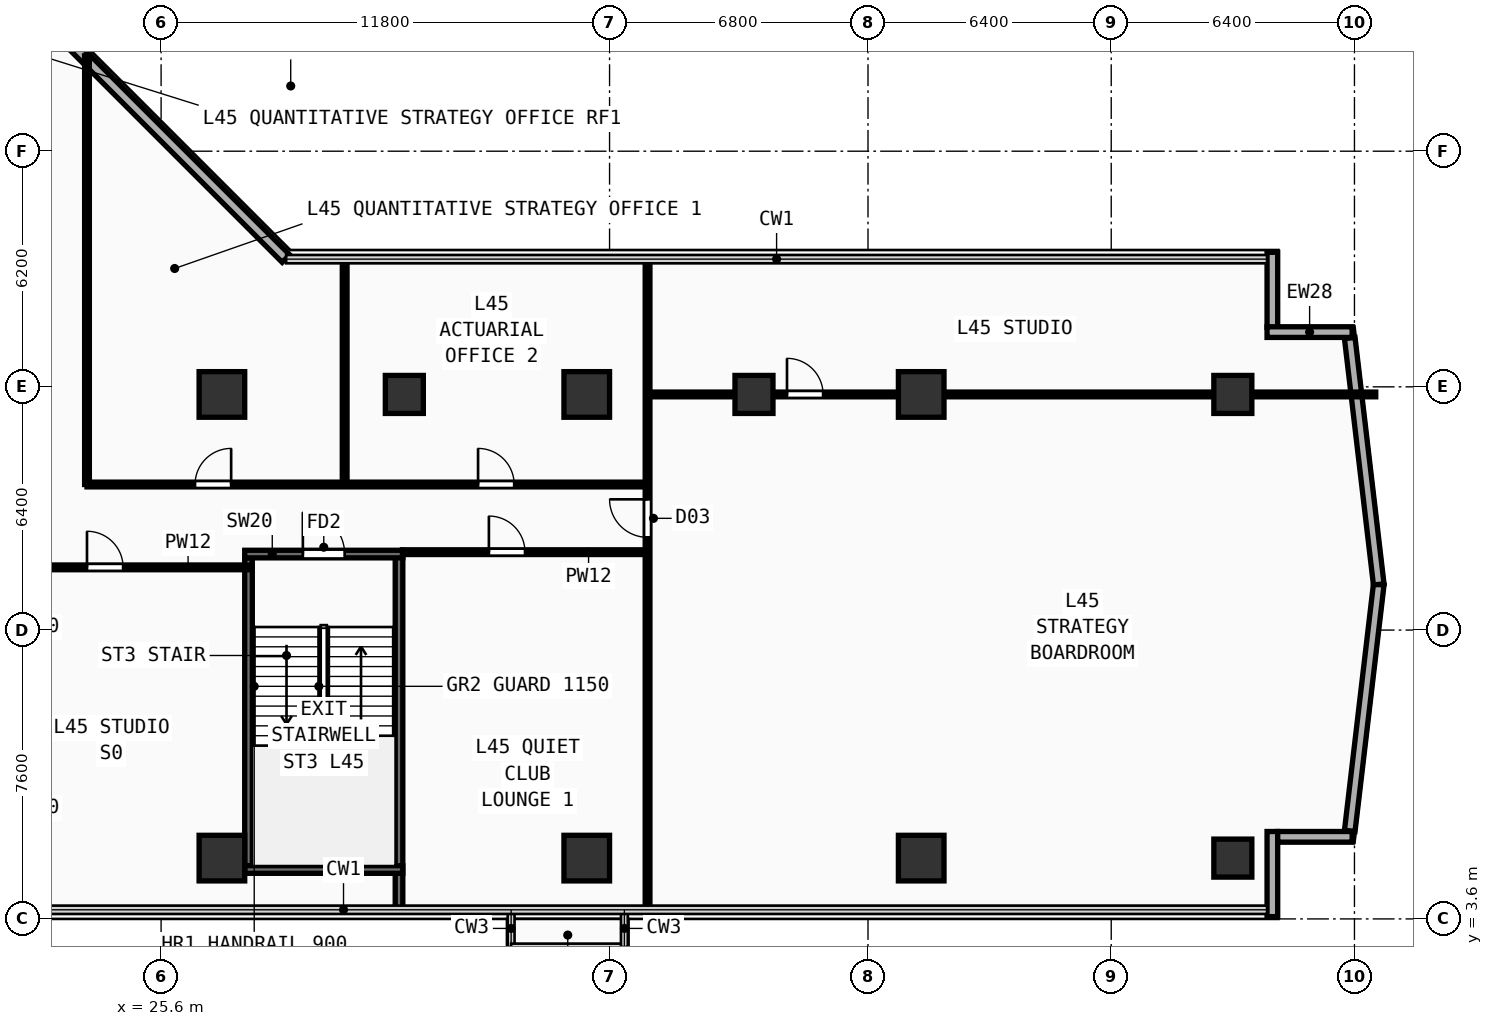
"""IFC4 building model, lengths in metres.
Left out: names, types, materials, properties, quantities, classifications, styles, units other than length and angle.
Written with IfcOpenShell. Run it as: python <this file> out.ifc"""

import sys

from ifc_helpers import new_model, si_unit, direction, frame, frame_2d, origin, origin_2d, place, context, subcontext, project, spatial, rectangle, extrude, element, fill, save


model = new_model("IFC4")
c1 = context("Model", 3, precision=1e-05, world=origin(), true_north=direction((0.0, 1.0)))
c2 = subcontext(c1, "Body", "Model", "MODEL_VIEW")
j1 = project(units=[si_unit("LENGTHUNIT", "METRE"), si_unit("PLANEANGLEUNIT", "RADIAN")], contexts=[c1])
p1 = place(None, origin())
s1 = spatial("IfcSite", under=j1, at=p1, CompositionType="ELEMENT")
p2 = place(p1, origin())
s2 = spatial("IfcBuilding", under=s1, at=p2, CompositionType="ELEMENT")
p3 = place(p2, frame((0.0, 0.0, 176.6)))
s3 = spatial("IfcBuildingStorey", under=s2, at=p3, CompositionType="ELEMENT", Elevation=176.6)
for number, where, z_axis, x_axis in (
    (1, (27.2, 5.2, 0.0), (0.0, 0.0, 1.0), (1.0, 0.0, 0.0)),
    (2, (36.8, 5.2, 0.0), (0.0, 0.0, 1.0), (1.0, 0.0, 0.0)),
    (3, (45.6, 5.2, 0.0), (0.0, 0.0, 1.0), (1.0, 0.0, 0.0)),
    (4, (27.2, 17.4, 0.0), (0.0, 0.0, 1.0), (1.0, 0.0, 0.0)),
    (5, (36.8, 17.4, 0.0), (0.0, 0.0, 1.0), (1.0, 0.0, 0.0)),
    (6, (45.6, 17.4, 0.0), (0.0, 0.0, 1.0), (1.0, 0.0, 0.0)),
):
    element("IfcColumn", number, at=place(p3, frame(where, z_axis=z_axis, x_axis=x_axis)), inside=s3, PredefinedType="COLUMN", context=c2, shape_type="SweptSolid", body=[
        extrude(rectangle(XDim=1.2, YDim=1.2, at=origin_2d()), origin(), (0.0, 0.0, 1.0), 3.56),
    ])
for number, where, z_axis, x_axis in (
    (7, (53.8, 5.2, 0.0), (0.0, 0.0, 1.0), (1.0, 0.0, 0.0)),
    (8, (53.8, 17.4, 0.0), (0.0, 0.0, 1.0), (1.0, 0.0, 0.0)),
    (9, (32.0, 17.4, 0.0), (0.0, 0.0, 1.0), (1.0, 0.0, 0.0)),
    (10, (41.2, 17.4, 0.0), (0.0, 0.0, 1.0), (1.0, 0.0, 0.0)),
):
    element("IfcColumn", number, at=place(p3, frame(where, z_axis=z_axis, x_axis=x_axis)), inside=s3, PredefinedType="COLUMN", context=c2, shape_type="SweptSolid", body=[
        extrude(rectangle(XDim=1.0, YDim=1.0, at=origin_2d()), origin(), (0.0, 0.0, 1.0), 3.56),
    ])
p4 = place(p3, frame((54.84, 3.66, 0.0), z_axis=(0.0, 0.0, 1.0), x_axis=(0.0, 1.0, 0.0)))
e11 = element("IfcWall", 11, at=p4, inside=s3, PredefinedType="SOLIDWALL", context=c2, shape_type="SweptSolid", body=[
    extrude(rectangle(XDim=2.24, YDim=0.28, at=frame_2d((1.12, 0.0))), origin(), (0.0, 0.0, 1.0), 3.56),
])
p5 = place(p3, frame((54.98, 5.76, 0.0), z_axis=(0.0, 0.0, 1.0), x_axis=(1.0, 0.0, 0.0)))
e12 = element("IfcWall", 12, at=p5, inside=s3, PredefinedType="SOLIDWALL", context=c2, shape_type="SweptSolid", body=[
    extrude(rectangle(XDim=1.96, YDim=0.28, at=frame_2d((0.98, 0.0))), origin(), (0.0, 0.0, 1.0), 3.56),
])
p6 = place(p3, frame((54.84, 19.165, 0.0), z_axis=(0.0, 0.0, 1.0), x_axis=(0.0, 1.0, 0.0)))
e13 = element("IfcWall", 13, at=p6, inside=s3, PredefinedType="SOLIDWALL", context=c2, shape_type="SweptSolid", body=[
    extrude(rectangle(XDim=1.975, YDim=0.28, at=frame_2d((0.987, 0.0))), origin(), (0.0, 0.0, 1.0), 3.56),
])
p7 = place(p3, frame((54.7, 19.04, 0.0), z_axis=(0.0, 0.0, 1.0), x_axis=(1.0, 0.0, 0.0)))
e14 = element("IfcWall", 14, at=p7, inside=s3, PredefinedType="SOLIDWALL", context=c2, shape_type="SweptSolid", body=[
    extrude(rectangle(XDim=2.24, YDim=0.28, at=frame_2d((1.12, 0.0))), origin(), (0.0, 0.0, 1.0), 3.56),
])
p8 = place(p3, frame((28.885, 20.975, 0.0), z_axis=(0.0, 0.0, 1.0), x_axis=(-0.707106781187, 0.707106781187, 0.0)))
e15 = element("IfcWall", 15, at=p8, inside=s3, PredefinedType="SOLIDWALL", context=c2, shape_type="SweptSolid", body=[
    extrude(rectangle(XDim=9.207, YDim=0.28, at=frame_2d((4.603, 0.0))), origin(), (0.0, 0.0, 1.0), 3.56),
])
for number, where, z_axis, x_axis in (
    (16, (56.876, 5.917, 0.0), (0.0, 0.0, 1.0), (0.117, 0.993, 0.0)),
    (17, (57.639, 12.401, 0.0), (0.0, 0.0, 1.0), (-0.117, 0.993, 0.0)),
):
    element("IfcWall", number, at=place(p3, frame(where, z_axis=z_axis, x_axis=x_axis)), inside=s3, PredefinedType="SOLIDWALL", context=c2, shape_type="SweptSolid", body=[
        extrude(rectangle(XDim=6.527, YDim=0.28, at=frame_2d((3.263, 0.0))), origin(), (0.0, 0.0, 1.0), 3.56),
    ])
p9 = place(p3, frame((27.9, 5.0, 0.0), z_axis=(0.0, 0.0, 1.0), x_axis=(0.0, 1.0, 0.0)))
e18 = element("IfcWall", 18, at=p9, inside=s3, PredefinedType="SHEAR", context=c2, shape_type="SweptSolid", body=[
    extrude(rectangle(XDim=8.1, YDim=0.2, at=frame_2d((4.05, 0.0))), origin(), (0.0, 0.0, 1.0), 3.56),
])
p10 = place(p3, frame((31.86, 3.84, 0.0), z_axis=(0.0, 0.0, 1.0), x_axis=(0.0, 1.0, 0.0)))
e19 = element("IfcWall", 19, at=p10, inside=s3, PredefinedType="SHEAR", context=c2, shape_type="SweptSolid", body=[
    extrude(rectangle(XDim=9.41, YDim=0.2, at=frame_2d((4.705, 0.0))), origin(), (0.0, 0.0, 1.0), 3.56),
])
p11 = place(p3, frame((27.8, 4.9, 0.0), z_axis=(0.0, 0.0, 1.0), x_axis=(1.0, 0.0, 0.0)))
e20 = element("IfcWall", 20, at=p11, inside=s3, PredefinedType="SHEAR", context=c2, shape_type="SweptSolid", body=[
    extrude(rectangle(XDim=4.16, YDim=0.2, at=frame_2d((2.08, 0.0))), origin(), (0.0, 0.0, 1.0), 3.56),
])
p12 = place(p3, frame((27.8, 13.2, 0.0), z_axis=(0.0, 0.0, 1.0), x_axis=(1.0, 0.0, 0.0)))
e21 = element("IfcWall", 21, at=p12, inside=s3, PredefinedType="SHEAR", context=c2, shape_type="SweptSolid", body=[
    extrude(rectangle(XDim=4.16, YDim=0.2, at=frame_2d((2.08, 0.0))), origin(), (0.0, 0.0, 1.0), 3.56),
])
p13 = place(p12, frame((1.53, 0.0, 0.0)))
e22 = element("IfcOpeningElement", 22, at=p13, cuts=e21, PredefinedType="OPENING", context=c2, shape_type="SweptSolid", body=[
    extrude(rectangle(XDim=1.1, YDim=2.2, at=frame_2d((0.55, 1.1))), frame((0.0, 0.11, 0.0), z_axis=(0.0, -1.0, 0.0), x_axis=(1.0, 0.0, 0.0)), (0.0, 0.0, 1.0), 0.22),
])
p14 = place(p3, frame((20.85, 12.85, 0.0), z_axis=(0.0, 0.0, 1.0), x_axis=(1.0, 0.0, 0.0)))
e23 = element("IfcWall", 23, at=p14, inside=s3, PredefinedType="PARTITIONING", context=c2, shape_type="SweptSolid", body=[
    extrude(rectangle(XDim=7.05, YDim=0.125, at=frame_2d((3.525, 0.0))), origin(), (0.0, 0.0, 1.0), 3.56),
])
p15 = place(p14, frame((2.8, 0.0, 0.0)))
e24 = element("IfcOpeningElement", 24, at=p15, cuts=e23, PredefinedType="OPENING", context=c2, shape_type="SweptSolid", body=[
    extrude(rectangle(XDim=0.95, YDim=2.15, at=frame_2d((0.475, 1.075))), frame((0.0, 0.073, 0.0), z_axis=(0.0, -1.0, 0.0), x_axis=(1.0, 0.0, 0.0)), (0.0, 0.0, 1.0), 0.145),
])
p16 = place(p3, frame((31.95, 13.25, 0.0), z_axis=(0.0, 0.0, 1.0), x_axis=(1.0, 0.0, 0.0)))
e25 = element("IfcWall", 25, at=p16, inside=s3, PredefinedType="PARTITIONING", context=c2, shape_type="SweptSolid", body=[
    extrude(rectangle(XDim=6.45, YDim=0.125, at=frame_2d((3.225, 0.0))), origin(), (0.0, 0.0, 1.0), 3.16),
])
p17 = place(p16, frame((2.275, 0.0, 0.0)))
e26 = element("IfcOpeningElement", 26, at=p17, cuts=e25, PredefinedType="OPENING", context=c2, shape_type="SweptSolid", body=[
    extrude(rectangle(XDim=0.95, YDim=2.15, at=frame_2d((0.475, 1.075))), frame((0.0, 0.073, 0.0), z_axis=(0.0, -1.0, 0.0), x_axis=(1.0, 0.0, 0.0)), (0.0, 0.0, 1.0), 0.145),
])
p18 = place(p3, frame((38.4, 3.84, 0.0), z_axis=(0.0, 0.0, 1.0), x_axis=(0.0, 1.0, 0.0)))
e27 = element("IfcWall", 27, at=p18, inside=s3, PredefinedType="PARTITIONING", context=c2, shape_type="SweptSolid", body=[
    extrude(rectangle(XDim=17.12, YDim=0.125, at=frame_2d((8.56, 0.0))), origin(), (0.0, 0.0, 1.0), 3.56),
])
p19 = place(p18, frame((9.8, 0.0, 0.0)))
e28 = element("IfcOpeningElement", 28, at=p19, cuts=e27, PredefinedType="OPENING", context=c2, shape_type="SweptSolid", body=[
    extrude(rectangle(XDim=1.0, YDim=2.2, at=frame_2d((0.5, 1.1))), frame((0.0, 0.073, 0.0), z_axis=(0.0, -1.0, 0.0), x_axis=(1.0, 0.0, 0.0)), (0.0, 0.0, 1.0), 0.145),
])
p20 = place(p3, frame((38.4, 17.4, 0.0), z_axis=(0.0, 0.0, 1.0), x_axis=(1.0, 0.0, 0.0)))
e29 = element("IfcWall", 29, at=p20, inside=s3, PredefinedType="PARTITIONING", context=c2, shape_type="SweptSolid", body=[
    extrude(rectangle(XDim=19.16, YDim=0.125, at=frame_2d((9.58, 0.0))), origin(), (0.0, 0.0, 1.0), 3.2),
])
p21 = place(p20, frame((3.669, 0.0, 0.0)))
e30 = element("IfcOpeningElement", 30, at=p21, cuts=e29, PredefinedType="OPENING", context=c2, shape_type="SweptSolid", body=[
    extrude(rectangle(XDim=0.95, YDim=2.15, at=frame_2d((0.475, 1.075))), frame((0.0, 0.073, 0.0), z_axis=(0.0, -1.0, 0.0), x_axis=(1.0, 0.0, 0.0)), (0.0, 0.0, 1.0), 0.145),
])
p22 = place(p3, frame((23.65, 15.03, 0.0), z_axis=(0.0, 0.0, 1.0), x_axis=(0.0, 1.0, 0.0)))
e31 = element("IfcWall", 31, at=p22, inside=s3, PredefinedType="PARTITIONING", context=c2, shape_type="SweptSolid", body=[
    extrude(rectangle(XDim=11.28, YDim=0.125, at=frame_2d((5.64, 0.0))), origin(), (0.0, 0.0, 1.0), 3.56),
])
p23 = place(p3, frame((23.65, 15.03, 0.0), z_axis=(0.0, 0.0, 1.0), x_axis=(1.0, 0.0, 0.0)))
e32 = element("IfcWall", 32, at=p23, inside=s3, PredefinedType="PARTITIONING", context=c2, shape_type="SweptSolid", body=[
    extrude(rectangle(XDim=14.75, YDim=0.125, at=frame_2d((7.375, 0.0))), origin(), (0.0, 0.0, 1.0), 3.56),
])
p24 = place(p23, frame((2.843, 0.0, 0.0)))
e33 = element("IfcOpeningElement", 33, at=p24, cuts=e32, PredefinedType="OPENING", context=c2, shape_type="SweptSolid", body=[
    extrude(rectangle(XDim=0.95, YDim=2.15, at=frame_2d((0.475, 1.075))), frame((0.0, 0.073, 0.0), z_axis=(0.0, -1.0, 0.0), x_axis=(1.0, 0.0, 0.0)), (0.0, 0.0, 1.0), 0.145),
])
p25 = place(p23, frame((10.29, 0.0, 0.0)))
e34 = element("IfcOpeningElement", 34, at=p25, cuts=e32, PredefinedType="OPENING", context=c2, shape_type="SweptSolid", body=[
    extrude(rectangle(XDim=0.95, YDim=2.15, at=frame_2d((0.475, 1.075))), frame((0.0, 0.073, 0.0), z_axis=(0.0, -1.0, 0.0), x_axis=(1.0, 0.0, 0.0)), (0.0, 0.0, 1.0), 0.145),
])
p26 = place(p3, frame((30.43, 15.03, 0.0), z_axis=(0.0, 0.0, 1.0), x_axis=(0.0, 1.0, 0.0)))
e35 = element("IfcWall", 35, at=p26, inside=s3, PredefinedType="PARTITIONING", context=c2, shape_type="SweptSolid", body=[
    extrude(rectangle(XDim=5.93, YDim=0.125, at=frame_2d((2.965, 0.0))), origin(), (0.0, 0.0, 1.0), 3.56),
])
p27 = place(p13, frame((1.1, 0.0, 0.0), z_axis=(0.0, 0.0, 1.0), x_axis=(-1.0, 0.0, 0.0)))
e36 = element("IfcDoor", 36, at=p27, inside=s3, OperationType="SINGLE_SWING_RIGHT", PredefinedType="DOOR", context=c2, shape_type="SweptSolid", body=[
    extrude(rectangle(XDim=1.1, YDim=2.2, at=frame_2d((0.55, 1.1))), frame((0.0, 0.025, 0.0), z_axis=(0.0, -1.0, 0.0), x_axis=(1.0, 0.0, 0.0)), (0.0, 0.0, 1.0), 0.05),
])
fill(e22, e36)
p28 = place(p15, origin())
e37 = element("IfcDoor", 37, at=p28, inside=s3, OperationType="SINGLE_SWING_LEFT", PredefinedType="DOOR", context=c2, shape_type="SweptSolid", body=[
    extrude(rectangle(XDim=0.95, YDim=2.15, at=frame_2d((0.475, 1.075))), frame((0.0, 0.025, 0.0), z_axis=(0.0, -1.0, 0.0), x_axis=(1.0, 0.0, 0.0)), (0.0, 0.0, 1.0), 0.05),
])
fill(e24, e37)
p29 = place(p17, origin())
e38 = element("IfcDoor", 38, at=p29, inside=s3, OperationType="SINGLE_SWING_LEFT", PredefinedType="DOOR", context=c2, shape_type="SweptSolid", body=[
    extrude(rectangle(XDim=0.95, YDim=2.15, at=frame_2d((0.475, 1.075))), frame((0.0, 0.025, 0.0), z_axis=(0.0, -1.0, 0.0), x_axis=(1.0, 0.0, 0.0)), (0.0, 0.0, 1.0), 0.05),
])
fill(e26, e38)
p30 = place(p19, origin())
e39 = element("IfcDoor", 39, at=p30, inside=s3, OperationType="SINGLE_SWING_RIGHT", PredefinedType="DOOR", context=c2, shape_type="SweptSolid", body=[
    extrude(rectangle(XDim=1.0, YDim=2.2, at=frame_2d((0.5, 1.1))), frame((0.0, 0.025, 0.0), z_axis=(0.0, -1.0, 0.0), x_axis=(1.0, 0.0, 0.0)), (0.0, 0.0, 1.0), 0.05),
])
fill(e28, e39)
p31 = place(p21, origin())
e40 = element("IfcDoor", 40, at=p31, inside=s3, OperationType="SINGLE_SWING_LEFT", PredefinedType="DOOR", context=c2, shape_type="SweptSolid", body=[
    extrude(rectangle(XDim=0.95, YDim=2.15, at=frame_2d((0.475, 1.075))), frame((0.0, 0.025, 0.0), z_axis=(0.0, -1.0, 0.0), x_axis=(1.0, 0.0, 0.0)), (0.0, 0.0, 1.0), 0.05),
])
fill(e30, e40)
p32 = place(p24, origin())
e41 = element("IfcDoor", 41, at=p32, inside=s3, OperationType="SINGLE_SWING_RIGHT", PredefinedType="DOOR", context=c2, shape_type="SweptSolid", body=[
    extrude(rectangle(XDim=0.95, YDim=2.15, at=frame_2d((0.475, 1.075))), frame((0.0, 0.025, 0.0), z_axis=(0.0, -1.0, 0.0), x_axis=(1.0, 0.0, 0.0)), (0.0, 0.0, 1.0), 0.05),
])
fill(e33, e41)
p33 = place(p25, origin())
e42 = element("IfcDoor", 42, at=p33, inside=s3, OperationType="SINGLE_SWING_LEFT", PredefinedType="DOOR", context=c2, shape_type="SweptSolid", body=[
    extrude(rectangle(XDim=0.95, YDim=2.15, at=frame_2d((0.475, 1.075))), frame((0.0, 0.025, 0.0), z_axis=(0.0, -1.0, 0.0), x_axis=(1.0, 0.0, 0.0)), (0.0, 0.0, 1.0), 0.05),
])
fill(e34, e42)
save(model, sys.argv[1])
